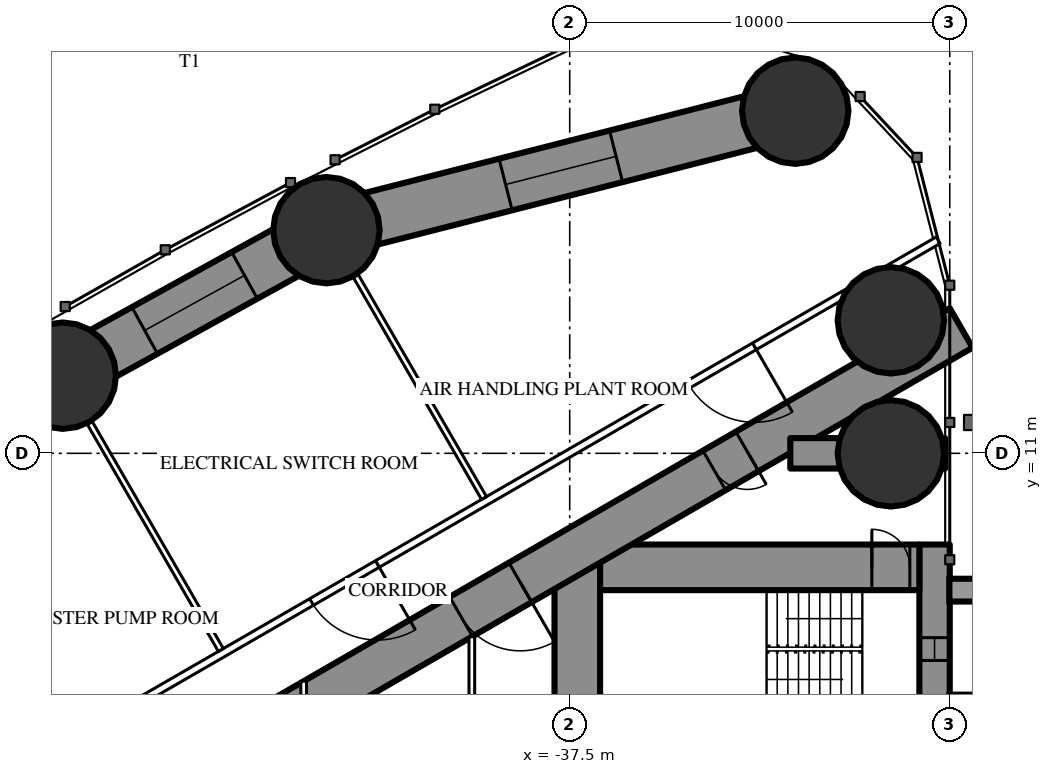
"""IFC4 building model, lengths in metres.
Left out: names, types, materials, properties, quantities, classifications, styles, units other than length and angle.
Written with IfcOpenShell. Run it as: python <this file> out.ifc"""

import sys

from ifc_helpers import new_model, si_unit, direction, frame, frame_2d, origin, origin_2d, place, context, subcontext, project, spatial, rectangle, circle, extrude, element, fill, save


model = new_model("IFC4")
c1 = context("Model", 3, precision=1e-05, world=origin(), true_north=direction((0.0, 1.0)))
c2 = subcontext(c1, "Body", "Model", "MODEL_VIEW")
j1 = project(units=[si_unit("LENGTHUNIT", "METRE"), si_unit("PLANEANGLEUNIT", "RADIAN")], contexts=[c1])
p1 = place(None, origin())
s1 = spatial("IfcSite", under=j1, at=p1, CompositionType="ELEMENT")
p2 = place(p1, origin())
s2 = spatial("IfcBuilding", under=s1, at=p2, CompositionType="ELEMENT")
p3 = place(p2, frame((0.0, 0.0, 201.8)))
s3 = spatial("IfcBuildingStorey", under=s2, at=p3, CompositionType="ELEMENT", Elevation=201.8)
for number, where, z_axis, x_axis in (
    (1, (-31.565, 20.016, 0.0), (0.0, 0.0, 1.0), (1.0, 0.0, 0.0)),
    (2, (-29.05, 11.0, 0.0), (0.0, 0.0, 1.0), (1.0, 0.0, 0.0)),
    (3, (-29.05, 14.5, 0.0), (0.0, 0.0, 1.0), (1.0, 0.0, 0.0)),
    (4, (-43.9, 16.871, 0.0), (0.0, 0.0, 1.0), (1.0, 0.0, 0.0)),
    (5, (-50.839, 13.043, 0.0), (0.0, 0.0, 1.0), (1.0, 0.0, 0.0)),
):
    element("IfcColumn", number, at=place(p3, frame(where, z_axis=z_axis, x_axis=x_axis)), inside=s3, PredefinedType="COLUMN", context=c2, shape_type="SweptSolid", body=[
        extrude(circle(Radius=1.4, at=origin_2d()), origin(), (0.0, 0.0, 1.0), 3.5),
    ])
p4 = place(p3, frame((-27.9, 8.6, 0.0), z_axis=(0.0, 0.0, 1.0), x_axis=(0.0, -1.0, 0.0)))
e6 = element("IfcWall", 6, at=p4, inside=s3, PredefinedType="SHEAR", context=c2, shape_type="SweptSolid", body=[
    extrude(rectangle(XDim=17.2, YDim=0.8, at=frame_2d((8.6, 0.0))), origin(), (0.0, 0.0, 1.0), 3.5),
])
p5 = place(p4, frame((2.45, 0.0, 0.6)))
e7 = element("IfcOpeningElement", 7, at=p5, cuts=e6, PredefinedType="OPENING", context=c2, shape_type="SweptSolid", body=[
    extrude(rectangle(XDim=0.6, YDim=2.1, at=frame_2d((0.3, 1.05))), frame((0.0, 0.41, 0.0), z_axis=(0.0, -1.0, 0.0), x_axis=(1.0, 0.0, 0.0)), (0.0, 0.0, 1.0), 0.82),
])
p6 = place(p4, frame((14.15, 0.0, 0.6)))
e8 = element("IfcOpeningElement", 8, at=p6, cuts=e6, PredefinedType="OPENING", context=c2, shape_type="SweptSolid", body=[
    extrude(rectangle(XDim=0.6, YDim=2.1, at=frame_2d((0.3, 1.05))), frame((0.0, 0.41, 0.0), z_axis=(0.0, -1.0, 0.0), x_axis=(1.0, 0.0, 0.0)), (0.0, 0.0, 1.0), 0.82),
])
p7 = place(p3, frame((-37.3, 8.6, 0.0), z_axis=(0.0, 0.0, 1.0), x_axis=(0.0, -1.0, 0.0)))
e9 = element("IfcWall", 9, at=p7, inside=s3, PredefinedType="SHEAR", context=c2, shape_type="SweptSolid", body=[
    extrude(rectangle(XDim=17.2, YDim=1.2, at=frame_2d((8.6, 0.0))), origin(), (0.0, 0.0, 1.0), 3.5),
])
p8 = place(p7, frame((7.7, 0.0, 0.0)))
e10 = element("IfcOpeningElement", 10, at=p8, cuts=e9, PredefinedType="OPENING", context=c2, shape_type="SweptSolid", body=[
    extrude(rectangle(XDim=1.8, YDim=2.2, at=frame_2d((0.9, 1.1))), frame((0.0, 0.61, 0.0), z_axis=(0.0, -1.0, 0.0), x_axis=(1.0, 0.0, 0.0)), (0.0, 0.0, 1.0), 1.22),
])
p9 = place(p3, frame((-28.3, 8.0, 0.0), z_axis=(0.0, 0.0, 1.0), x_axis=(-1.0, 0.0, 0.0)))
e11 = element("IfcWall", 11, at=p9, inside=s3, PredefinedType="SHEAR", context=c2, shape_type="SweptSolid", body=[
    extrude(rectangle(XDim=8.4, YDim=1.2, at=frame_2d((4.2, 0.0))), origin(), (0.0, 0.0, 1.0), 3.5),
])
p10 = place(p9, frame((0.25, 0.0, 0.0)))
e12 = element("IfcOpeningElement", 12, at=p10, cuts=e11, PredefinedType="OPENING", context=c2, shape_type="SweptSolid", body=[
    extrude(rectangle(XDim=1.0, YDim=2.2, at=frame_2d((0.5, 1.1))), frame((0.0, 0.61, 0.0), z_axis=(0.0, -1.0, 0.0), x_axis=(1.0, 0.0, 0.0)), (0.0, 0.0, 1.0), 1.22),
])
p11 = place(p3, frame((-27.2, 14.3, 0.0), z_axis=(0.0, 0.0, 1.0), x_axis=(-0.866026593062, -0.499997940104, 0.0)))
e13 = element("IfcWall", 13, at=p11, inside=s3, PredefinedType="SHEAR", context=c2, shape_type="SweptSolid", body=[
    extrude(rectangle(XDim=28.946, YDim=1.2, at=frame_2d((14.473, 0.0))), origin(), (0.0, 0.0, 1.0), 3.5),
])
p12 = place(p11, frame((6.5, 0.0, 0.0)))
e14 = element("IfcOpeningElement", 14, at=p12, cuts=e13, PredefinedType="OPENING", context=c2, shape_type="SweptSolid", body=[
    extrude(rectangle(XDim=1.0, YDim=2.2, at=frame_2d((0.5, 1.1))), frame((0.0, 0.61, 0.0), z_axis=(0.0, -1.0, 0.0), x_axis=(1.0, 0.0, 0.0)), (0.0, 0.0, 1.0), 1.22),
])
p13 = place(p11, frame((13.395, 0.0, 0.0)))
e15 = element("IfcOpeningElement", 15, at=p13, cuts=e13, PredefinedType="OPENING", context=c2, shape_type="SweptSolid", body=[
    extrude(rectangle(XDim=1.8, YDim=2.03, at=frame_2d((0.9, 1.015))), frame((0.0, 0.61, 0.0), z_axis=(0.0, -1.0, 0.0), x_axis=(1.0, 0.0, 0.0)), (0.0, 0.0, 1.0), 1.22),
])
p14 = place(p3, frame((-27.62, 11.0, 0.0), z_axis=(0.0, 0.0, 1.0), x_axis=(-1.0, 0.0, 0.0)))
e16 = element("IfcWall", 16, at=p14, inside=s3, PredefinedType="SHEAR", context=c2, shape_type="SweptSolid", body=[
    extrude(rectangle(XDim=4.076, YDim=0.8, at=frame_2d((2.038, 0.0))), origin(), (0.0, 0.0, 1.0), 3.5),
])
p15 = place(p3, frame((-31.565, 20.016, 0.0), z_axis=(0.0, 0.0, 1.0), x_axis=(-0.969008414312, -0.247027717052, 0.0)))
e17 = element("IfcWall", 17, at=p15, inside=s3, PredefinedType="SHEAR", context=c2, shape_type="SweptSolid", body=[
    extrude(rectangle(XDim=12.729, YDim=1.4, at=frame_2d((6.365, 0.0))), origin(), (0.0, 0.0, 1.0), 3.5),
])
p16 = place(p15, frame((4.865, 0.0, 0.6)))
e18 = element("IfcOpeningElement", 18, at=p16, cuts=e17, PredefinedType="OPENING", context=c2, shape_type="SweptSolid", body=[
    extrude(rectangle(XDim=3.0, YDim=1.2, at=frame_2d((1.5, 0.6))), frame((0.0, 0.71, 0.0), z_axis=(0.0, -1.0, 0.0), x_axis=(1.0, 0.0, 0.0)), (0.0, 0.0, 1.0), 1.42),
])
p17 = place(p3, frame((-43.9, 16.871, 0.0), z_axis=(0.0, 0.0, 1.0), x_axis=(-0.875577684027, -0.483077342911, 0.0)))
e19 = element("IfcWall", 19, at=p17, inside=s3, PredefinedType="SHEAR", context=c2, shape_type="SweptSolid", body=[
    extrude(rectangle(XDim=7.925, YDim=1.4, at=frame_2d((3.962, 0.0))), origin(), (0.0, 0.0, 1.0), 3.5),
])
p18 = place(p17, frame((2.462, 0.0, 0.6)))
e20 = element("IfcOpeningElement", 20, at=p18, cuts=e19, PredefinedType="OPENING", context=c2, shape_type="SweptSolid", body=[
    extrude(rectangle(XDim=3.0, YDim=1.2, at=frame_2d((1.5, 0.6))), frame((0.0, 0.71, 0.0), z_axis=(0.0, -1.0, 0.0), x_axis=(1.0, 0.0, 0.0)), (0.0, 0.0, 1.0), 1.42),
])
p19 = place(p3, frame((-50.839, 13.043, 0.0), z_axis=(0.0, 0.0, 1.0), x_axis=(-0.851892008043, -0.523717487423, 0.0)))
e21 = element("IfcWall", 21, at=p19, inside=s3, PredefinedType="SHEAR", context=c2, shape_type="SweptSolid", body=[
    extrude(rectangle(XDim=7.924, YDim=1.4, at=frame_2d((3.962, 0.0))), origin(), (0.0, 0.0, 1.0), 3.5),
])
p20 = place(p19, frame((2.462, 0.0, 0.6)))
e22 = element("IfcOpeningElement", 22, at=p20, cuts=e21, PredefinedType="OPENING", context=c2, shape_type="SweptSolid", body=[
    extrude(rectangle(XDim=3.0, YDim=1.2, at=frame_2d((1.5, 0.6))), frame((0.0, 0.71, 0.0), z_axis=(0.0, -1.0, 0.0), x_axis=(1.0, 0.0, 0.0)), (0.0, 0.0, 1.0), 1.42),
])
p21 = place(p3, frame((-27.803, 16.608, 0.0), z_axis=(0.0, 0.0, 1.0), x_axis=(-0.866025851808, -0.499999223999, 0.0)))
e23 = element("IfcWall", 23, at=p21, inside=s3, PredefinedType="PARTITIONING", context=c2, shape_type="SweptSolid", body=[
    extrude(rectangle(XDim=33.215, YDim=0.2, at=frame_2d((16.608, 0.0))), origin(), (0.0, 0.0, 1.0), 3.25),
])
p22 = place(p21, frame((5.584, 0.0, 0.0)))
e24 = element("IfcOpeningElement", 24, at=p22, cuts=e23, PredefinedType="OPENING", context=c2, shape_type="SweptSolid", body=[
    extrude(rectangle(XDim=2.0, YDim=2.4, at=frame_2d((1.0, 1.2))), frame((0.0, 0.11, 0.0), z_axis=(0.0, -1.0, 0.0), x_axis=(1.0, 0.0, 0.0)), (0.0, 0.0, 1.0), 0.22),
])
p23 = place(p21, frame((17.04, 0.0, 0.0)))
e25 = element("IfcOpeningElement", 25, at=p23, cuts=e23, PredefinedType="OPENING", context=c2, shape_type="SweptSolid", body=[
    extrude(rectangle(XDim=2.0, YDim=2.4, at=frame_2d((1.0, 1.2))), frame((0.0, 0.11, 0.0), z_axis=(0.0, -1.0, 0.0), x_axis=(1.0, 0.0, 0.0)), (0.0, 0.0, 1.0), 0.22),
])
p24 = place(p21, frame((24.735, 0.0, 0.0)))
e26 = element("IfcOpeningElement", 26, at=p24, cuts=e23, PredefinedType="OPENING", context=c2, shape_type="SweptSolid", body=[
    extrude(rectangle(XDim=2.0, YDim=2.4, at=frame_2d((1.0, 1.2))), frame((0.0, 0.11, 0.0), z_axis=(0.0, -1.0, 0.0), x_axis=(1.0, 0.0, 0.0)), (0.0, 0.0, 1.0), 0.22),
])
p25 = place(p21, frame((30.361, 0.0, 0.0)))
e27 = element("IfcOpeningElement", 27, at=p25, cuts=e23, PredefinedType="OPENING", context=c2, shape_type="SweptSolid", body=[
    extrude(rectangle(XDim=2.0, YDim=2.03, at=frame_2d((1.0, 1.015))), frame((0.0, 0.11, 0.0), z_axis=(0.0, -1.0, 0.0), x_axis=(1.0, 0.0, 0.0)), (0.0, 0.0, 1.0), 0.22),
])
p26 = place(p3, frame((-39.754, 9.823, 0.0), z_axis=(0.0, 0.0, 1.0), x_axis=(-0.499997670926, 0.866026748472, 0.0)))
e28 = element("IfcWall", 28, at=p26, inside=s3, PredefinedType="PARTITIONING", context=c2, shape_type="SweptSolid", body=[
    extrude(rectangle(XDim=6.757, YDim=0.15, at=frame_2d((3.379, 0.0))), origin(), (0.0, 0.0, 1.0), 2.05),
])
p27 = place(p3, frame((-46.679, 5.825, 0.0), z_axis=(0.0, 0.0, 1.0), x_axis=(-0.500006839597, 0.866021454905, 0.0)))
e29 = element("IfcWall", 29, at=p27, inside=s3, PredefinedType="PARTITIONING", context=c2, shape_type="SweptSolid", body=[
    extrude(rectangle(XDim=6.911, YDim=0.15, at=frame_2d((3.456, 0.0))), origin(), (0.0, 0.0, 1.0), 2.05),
])
p28 = place(p3, frame((-40.075, 6.174, 0.0), z_axis=(0.0, 0.0, 1.0), x_axis=(0.0, -1.0, 0.0)))
e30 = element("IfcWall", 30, at=p28, inside=s3, PredefinedType="PARTITIONING", context=c2, shape_type="SweptSolid", body=[
    extrude(rectangle(XDim=12.348, YDim=0.15, at=frame_2d((6.174, 0.0))), origin(), (0.0, 0.0, 1.0), 3.25),
])
p29 = place(p28, frame((5.274, 0.0, 0.0)))
e31 = element("IfcOpeningElement", 31, at=p29, cuts=e30, PredefinedType="OPENING", context=c2, shape_type="SweptSolid", body=[
    extrude(rectangle(XDim=1.8, YDim=2.2, at=frame_2d((0.9, 1.1))), frame((0.0, 0.085, 0.0), z_axis=(0.0, -1.0, 0.0), x_axis=(1.0, 0.0, 0.0)), (0.0, 0.0, 1.0), 0.17),
])
p30 = place(p3, frame((-44.5, 5.005, 0.0), z_axis=(0.0, 0.0, 1.0), x_axis=(0.0, -1.0, 0.0)))
e32 = element("IfcWall", 32, at=p30, inside=s3, PredefinedType="PARTITIONING", context=c2, shape_type="SweptSolid", body=[
    extrude(rectangle(XDim=10.009, YDim=0.15, at=frame_2d((5.005, 0.0))), origin(), (0.0, 0.0, 1.0), 3.25),
])
p31 = place(p30, frame((2.002, 0.0, 0.0)))
e33 = element("IfcOpeningElement", 33, at=p31, cuts=e32, PredefinedType="OPENING", context=c2, shape_type="SweptSolid", body=[
    extrude(rectangle(XDim=1.0, YDim=2.2, at=frame_2d((0.5, 1.1))), frame((0.0, 0.085, 0.0), z_axis=(0.0, -1.0, 0.0), x_axis=(1.0, 0.0, 0.0)), (0.0, 0.0, 1.0), 0.17),
])
p32 = place(p30, frame((7.007, 0.0, 0.0)))
e34 = element("IfcOpeningElement", 34, at=p32, cuts=e32, PredefinedType="OPENING", context=c2, shape_type="SweptSolid", body=[
    extrude(rectangle(XDim=1.0, YDim=2.2, at=frame_2d((0.5, 1.1))), frame((0.0, 0.085, 0.0), z_axis=(0.0, -1.0, 0.0), x_axis=(1.0, 0.0, 0.0)), (0.0, 0.0, 1.0), 0.17),
])
p33 = place(p16, origin())
e35 = element("IfcWindow", 35, at=p33, inside=s3, PartitioningType="SINGLE_PANEL", PredefinedType="WINDOW", context=c2, shape_type="SweptSolid", body=[
    extrude(rectangle(XDim=3.0, YDim=1.2, at=frame_2d((1.5, 0.6))), frame((0.0, 0.03, 0.0), z_axis=(0.0, -1.0, 0.0), x_axis=(1.0, 0.0, 0.0)), (0.0, 0.0, 1.0), 0.06),
])
fill(e18, e35)
p34 = place(p18, origin())
e36 = element("IfcWindow", 36, at=p34, inside=s3, PartitioningType="SINGLE_PANEL", PredefinedType="WINDOW", context=c2, shape_type="SweptSolid", body=[
    extrude(rectangle(XDim=3.0, YDim=1.2, at=frame_2d((1.5, 0.6))), frame((0.0, 0.03, 0.0), z_axis=(0.0, -1.0, 0.0), x_axis=(1.0, 0.0, 0.0)), (0.0, 0.0, 1.0), 0.06),
])
fill(e20, e36)
p35 = place(p22, origin())
e37 = element("IfcDoor", 37, at=p35, inside=s3, OperationType="DOUBLE_DOOR_SINGLE_SWING", PredefinedType="DOOR", context=c2, shape_type="SweptSolid", body=[
    extrude(rectangle(XDim=2.0, YDim=2.4, at=frame_2d((1.0, 1.2))), frame((0.0, 0.025, 0.0), z_axis=(0.0, -1.0, 0.0), x_axis=(1.0, 0.0, 0.0)), (0.0, 0.0, 1.0), 0.05),
])
fill(e24, e37)
p36 = place(p23, origin())
e38 = element("IfcDoor", 38, at=p36, inside=s3, OperationType="DOUBLE_DOOR_SINGLE_SWING", PredefinedType="DOOR", context=c2, shape_type="SweptSolid", body=[
    extrude(rectangle(XDim=2.0, YDim=2.4, at=frame_2d((1.0, 1.2))), frame((0.0, 0.025, 0.0), z_axis=(0.0, -1.0, 0.0), x_axis=(1.0, 0.0, 0.0)), (0.0, 0.0, 1.0), 0.05),
])
fill(e25, e38)
p37 = place(p12, origin())
e39 = element("IfcDoor", 39, at=p37, inside=s3, OperationType="SINGLE_SWING_LEFT", PredefinedType="DOOR", context=c2, shape_type="SweptSolid", body=[
    extrude(rectangle(XDim=1.0, YDim=2.2, at=frame_2d((0.5, 1.1))), frame((0.0, 0.025, 0.0), z_axis=(0.0, -1.0, 0.0), x_axis=(1.0, 0.0, 0.0)), (0.0, 0.0, 1.0), 0.05),
])
fill(e14, e39)
p38 = place(p13, origin())
e40 = element("IfcDoor", 40, at=p38, inside=s3, OperationType="DOUBLE_DOOR_SINGLE_SWING", PredefinedType="DOOR", context=c2, shape_type="SweptSolid", body=[
    extrude(rectangle(XDim=1.8, YDim=2.03, at=frame_2d((0.9, 1.015))), frame((0.0, 0.025, 0.0), z_axis=(0.0, -1.0, 0.0), x_axis=(1.0, 0.0, 0.0)), (0.0, 0.0, 1.0), 0.05),
])
fill(e15, e40)
p39 = place(p10, origin())
e41 = element("IfcDoor", 41, at=p39, inside=s3, OperationType="SINGLE_SWING_RIGHT", PredefinedType="DOOR", context=c2, shape_type="SweptSolid", body=[
    extrude(rectangle(XDim=1.0, YDim=2.2, at=frame_2d((0.5, 1.1))), frame((0.0, 0.025, 0.0), z_axis=(0.0, -1.0, 0.0), x_axis=(1.0, 0.0, 0.0)), (0.0, 0.0, 1.0), 0.05),
])
fill(e12, e41)
p40 = place(p5, origin())
e42 = element("IfcWindow", 42, at=p40, inside=s3, PartitioningType="SINGLE_PANEL", PredefinedType="WINDOW", context=c2, shape_type="SweptSolid", body=[
    extrude(rectangle(XDim=0.6, YDim=2.1, at=frame_2d((0.3, 1.05))), frame((0.0, 0.03, 0.0), z_axis=(0.0, -1.0, 0.0), x_axis=(1.0, 0.0, 0.0)), (0.0, 0.0, 1.0), 0.06),
])
fill(e7, e42)
save(model, sys.argv[1])
